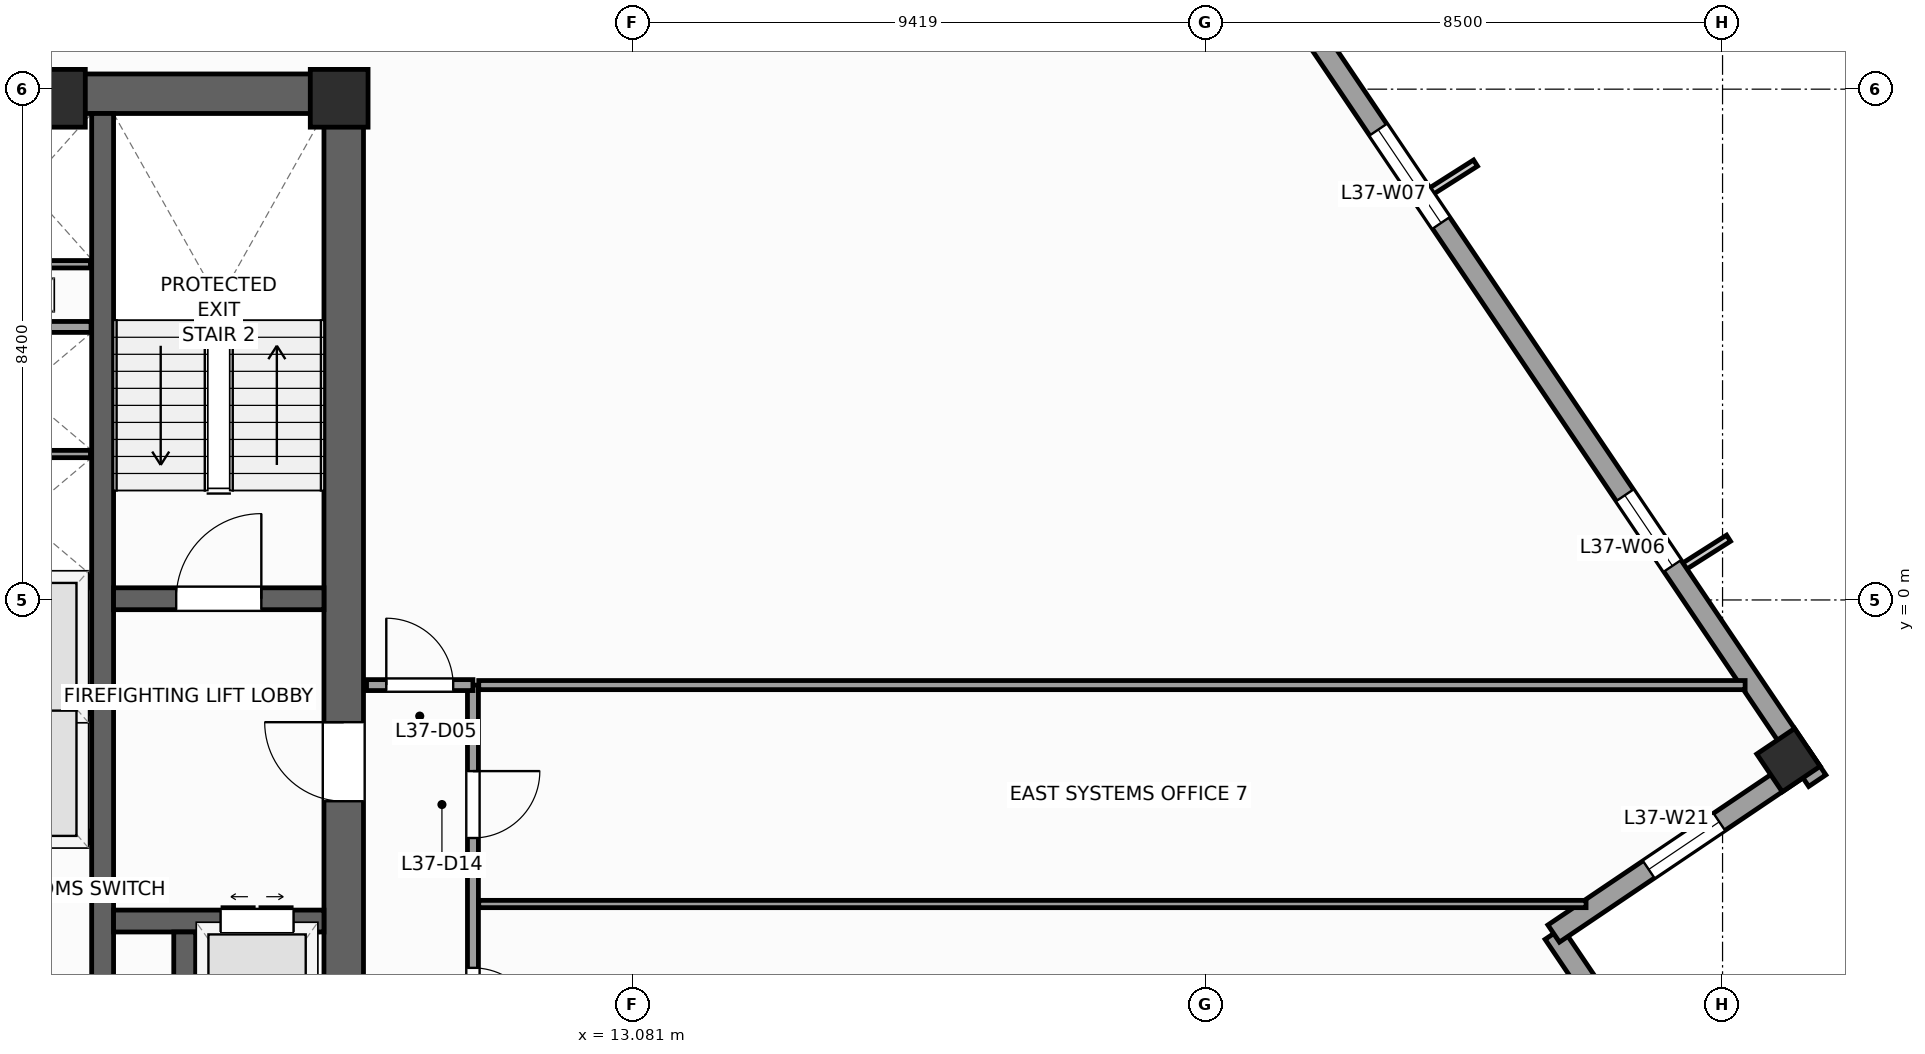
"""IFC4 building model, lengths in metres.
Left out: names, types, materials, properties, quantities, classifications, styles, units other than length and angle.
Written with IfcOpenShell. Run it as: python <this file> out.ifc"""

import sys

from ifc_helpers import new_model, si_unit, direction, frame, frame_2d, origin, origin_2d, place, context, subcontext, project, spatial, rectangle, extrude, source, transform, mapped, element, fill, save


model = new_model("IFC4")
c1 = context("Model", 3, precision=1e-05, world=origin(), true_north=direction((0.0, 1.0)))
c2 = subcontext(c1, "Body", "Model", "MODEL_VIEW")
j1 = project(units=[si_unit("LENGTHUNIT", "METRE"), si_unit("PLANEANGLEUNIT", "RADIAN")], contexts=[c1])
p1 = place(None, origin())
s1 = spatial("IfcSite", under=j1, at=p1, CompositionType="ELEMENT")
p2 = place(p1, origin())
s2 = spatial("IfcBuilding", under=s1, at=p2, CompositionType="ELEMENT")
p3 = place(p2, frame((0.0, 0.0, 156.4)))
s3 = spatial("IfcBuildingStorey", under=s2, at=p3, CompositionType="ELEMENT", Elevation=156.4)
p4 = place(p3, frame((-8.65, 8.325, 0.0), z_axis=(0.0, 0.0, 1.0), x_axis=(1.0, 0.0, 0.0)))
e1 = element("IfcWall", 1, at=p4, inside=s3, PredefinedType="SHEAR", context=c2, shape_type="SweptSolid", body=[
    extrude(rectangle(XDim=17.3, YDim=0.65, at=frame_2d((8.65, 0.0))), origin(), (0.0, 0.0, 1.0), 4.0),
])
p5 = place(p3, frame((8.325, -8.0, 0.0), z_axis=(0.0, 0.0, 1.0), x_axis=(0.0, 1.0, 0.0)))
e2 = element("IfcWall", 2, at=p5, inside=s3, PredefinedType="SHEAR", context=c2, shape_type="SweptSolid", body=[
    extrude(rectangle(XDim=16.0, YDim=0.65, at=frame_2d((8.0, 0.0))), origin(), (0.0, 0.0, 1.0), 4.0),
])
p6 = place(p5, frame((4.69, 0.0, 0.0)))
e3 = element("IfcOpeningElement", 3, at=p6, cuts=e2, PredefinedType="OPENING", context=c2, shape_type="SweptSolid", body=[
    extrude(rectangle(XDim=1.3, YDim=2.2, at=frame_2d((0.65, 1.1))), frame((0.0, 0.335, 0.0), z_axis=(0.0, -1.0, 0.0), x_axis=(1.0, 0.0, 0.0)), (0.0, 0.0, 1.0), 0.67),
])
p7 = place(p3, frame((4.36, -8.0, 0.0), z_axis=(0.0, 0.0, 1.0), x_axis=(0.0, 1.0, 0.0)))
e4 = element("IfcWall", 4, at=p7, inside=s3, PredefinedType="SHEAR", context=c2, shape_type="SweptSolid", body=[
    extrude(rectangle(XDim=16.0, YDim=0.36, at=frame_2d((8.0, 0.0))), origin(), (0.0, 0.0, 1.0), 4.0),
])
p8 = place(p3, frame((4.54, 0.02, 0.0), z_axis=(0.0, 0.0, 1.0), x_axis=(1.0, 0.0, 0.0)))
e5 = element("IfcWall", 5, at=p8, inside=s3, PredefinedType="SHEAR", context=c2, shape_type="SweptSolid", body=[
    extrude(rectangle(XDim=3.46, YDim=0.36, at=frame_2d((1.73, 0.0))), origin(), (0.0, 0.0, 1.0), 4.0),
])
p9 = place(p8, frame((1.03, 0.0, 0.0)))
e6 = element("IfcOpeningElement", 6, at=p9, cuts=e5, PredefinedType="OPENING", context=c2, shape_type="SweptSolid", body=[
    extrude(rectangle(XDim=1.4, YDim=2.2, at=frame_2d((0.7, 1.1))), frame((0.0, 0.19, 0.0), z_axis=(0.0, -1.0, 0.0), x_axis=(1.0, 0.0, 0.0)), (0.0, 0.0, 1.0), 0.38),
])
p10 = place(p3, frame((4.54, -5.28, 0.0), z_axis=(0.0, 0.0, 1.0), x_axis=(1.0, 0.0, 0.0)))
e7 = element("IfcWall", 7, at=p10, inside=s3, PredefinedType="SHEAR", context=c2, shape_type="SweptSolid", body=[
    extrude(rectangle(XDim=3.46, YDim=0.36, at=frame_2d((1.73, 0.0))), origin(), (0.0, 0.0, 1.0), 4.0),
])
p11 = place(p10, frame((1.76, 0.0, 0.0)))
e8 = element("IfcOpeningElement", 8, at=p11, cuts=e7, PredefinedType="OPENING", context=c2, shape_type="SweptSolid", body=[
    extrude(rectangle(XDim=1.2, YDim=2.25, at=frame_2d((0.6, 1.125))), frame((0.0, 0.19, 0.0), z_axis=(0.0, -1.0, 0.0), x_axis=(1.0, 0.0, 0.0)), (0.0, 0.0, 1.0), 0.38),
])
p12 = place(p3, frame((5.71, -8.0, 0.0), z_axis=(0.0, 0.0, 1.0), x_axis=(0.0, 1.0, 0.0)))
e9 = element("IfcWall", 9, at=p12, inside=s3, PredefinedType="SHEAR", context=c2, shape_type="SweptSolid", body=[
    extrude(rectangle(XDim=2.54, YDim=0.36, at=frame_2d((1.27, 0.0))), origin(), (0.0, 0.0, 1.0), 4.0),
])
m1 = source(origin(), c2, "Body", "SweptSolid", [
    extrude(rectangle(XDim=0.95, YDim=0.95, at=origin_2d()), origin(), (0.0, 0.0, 1.0), 4.0),
])
for number, where, z_axis, x_axis in (
    (10, (8.25, 8.25, 0.0), (0.0, 0.0, 1.0), (1.0, 0.0, 0.0)),
    (11, (3.6, 8.25, 0.0), (0.0, 0.0, 1.0), (1.0, 0.0, 0.0)),
):
    element("IfcColumn", number, at=place(p3, frame(where, z_axis=z_axis, x_axis=x_axis)), inside=s3, PredefinedType="PILASTER", context=c2, shape_type="MappedRepresentation", body=[
        mapped(m1, transform((0.0, 0.0, 0.0), scale=1.0)),
    ])
m2 = source(origin(), c2, "Body", "SweptSolid", [
    extrude(rectangle(XDim=0.75, YDim=0.75, at=origin_2d()), origin(), (0.0, 0.0, 1.0), 4.0),
])
p13 = place(p3, frame((32.083, -2.635, 0.0), z_axis=(0.0, 0.0, 1.0), x_axis=(0.829037572555, 0.559192903471, 0.0)))
e12 = element("IfcColumn", 12, at=p13, inside=s3, PredefinedType="COLUMN", context=c2, shape_type="MappedRepresentation", body=[
    mapped(m2, transform((0.0, 0.0, 0.0), scale=1.0)),
])
p14 = place(p3, frame((31.019, -9.631, 0.0), z_axis=(0.0, 0.0, 1.0), x_axis=(-0.559210350234, 0.829025804298, 0.0)))
e13 = element("IfcWall", 13, at=p14, inside=s3, PredefinedType="STANDARD", context=c2, shape_type="SweptSolid", body=[
    extrude(rectangle(XDim=5.0, YDim=0.34, at=frame_2d((2.5, 0.0))), origin(), (0.0, 0.0, 1.0), 3.74),
])
p15 = place(p3, frame((28.223, -5.486, 0.0), z_axis=(0.0, 0.0, 1.0), x_axis=(0.82905227345, 0.559171107879, 0.0)))
e14 = element("IfcWall", 14, at=p15, inside=s3, PredefinedType="STANDARD", context=c2, shape_type="SweptSolid", body=[
    extrude(rectangle(XDim=5.17, YDim=0.34, at=frame_2d((2.585, 0.0))), origin(), (0.0, 0.0, 1.0), 3.04),
])
p16 = place(p15, frame((1.885, 0.0, 0.56)))
e15 = element("IfcOpeningElement", 15, at=p16, cuts=e14, PredefinedType="OPENING", context=c2, shape_type="SweptSolid", body=[
    extrude(rectangle(XDim=1.4, YDim=2.4, at=frame_2d((0.7, 1.2))), frame((0.0, 0.18, 0.0), z_axis=(0.0, -1.0, 0.0), x_axis=(1.0, 0.0, 0.0)), (0.0, 0.0, 1.0), 0.36),
])
p17 = place(p3, frame((32.558, -2.972, 0.0), z_axis=(0.0, 0.0, 1.0), x_axis=(-0.559194910251, 0.829036218961, 0.0)))
e16 = element("IfcWall", 16, at=p17, inside=s3, PredefinedType="STANDARD", context=c2, shape_type="SweptSolid", body=[
    extrude(rectangle(XDim=41.34, YDim=0.34, at=frame_2d((20.67, 0.0))), origin(), (0.0, 0.0, 1.0), 3.04),
])
p18 = place(p17, frame((25.745, 0.0, 0.0)))
e17 = element("IfcOpeningElement", 17, at=p18, cuts=e16, PredefinedType="OPENING", context=c2, shape_type="SweptSolid", body=[
    extrude(rectangle(XDim=1.05, YDim=2.25, at=frame_2d((0.525, 1.125))), frame((0.0, 0.18, 0.0), z_axis=(0.0, -1.0, 0.0), x_axis=(1.0, 0.0, 0.0)), (0.0, 0.0, 1.0), 0.36),
])
p19 = place(p17, frame((4.261, 0.0, 0.56)))
e18 = element("IfcOpeningElement", 18, at=p19, cuts=e16, PredefinedType="OPENING", context=c2, shape_type="SweptSolid", body=[
    extrude(rectangle(XDim=1.4, YDim=2.4, at=frame_2d((0.7, 1.2))), frame((0.0, 0.18, 0.0), z_axis=(0.0, -1.0, 0.0), x_axis=(1.0, 0.0, 0.0)), (0.0, 0.0, 1.0), 0.36),
])
p20 = place(p17, frame((11.064, 0.0, 0.61)))
e19 = element("IfcOpeningElement", 19, at=p20, cuts=e16, PredefinedType="OPENING", context=c2, shape_type="SweptSolid", body=[
    extrude(rectangle(XDim=1.85, YDim=2.35, at=frame_2d((0.925, 1.175))), frame((0.0, 0.18, 0.0), z_axis=(0.0, -1.0, 0.0), x_axis=(1.0, 0.0, 0.0)), (0.0, 0.0, 1.0), 0.36),
])
p21 = place(p17, frame((18.168, 0.0, 0.61)))
e20 = element("IfcOpeningElement", 20, at=p21, cuts=e16, PredefinedType="OPENING", context=c2, shape_type="SweptSolid", body=[
    extrude(rectangle(XDim=1.85, YDim=2.35, at=frame_2d((0.925, 1.175))), frame((0.0, 0.18, 0.0), z_axis=(0.0, -1.0, 0.0), x_axis=(1.0, 0.0, 0.0)), (0.0, 0.0, 1.0), 0.36),
])
p22 = place(p17, frame((27.936, 0.0, 0.61)))
e21 = element("IfcOpeningElement", 21, at=p22, cuts=e16, PredefinedType="OPENING", context=c2, shape_type="SweptSolid", body=[
    extrude(rectangle(XDim=1.85, YDim=2.35, at=frame_2d((0.925, 1.175))), frame((0.0, 0.18, 0.0), z_axis=(0.0, -1.0, 0.0), x_axis=(1.0, 0.0, 0.0)), (0.0, 0.0, 1.0), 0.36),
])
p23 = place(p17, frame((34.852, 0.0, 0.56)))
e22 = element("IfcOpeningElement", 22, at=p23, cuts=e16, PredefinedType="OPENING", context=c2, shape_type="SweptSolid", body=[
    extrude(rectangle(XDim=1.4, YDim=2.4, at=frame_2d((0.7, 1.2))), frame((0.0, 0.18, 0.0), z_axis=(0.0, -1.0, 0.0), x_axis=(1.0, 0.0, 0.0)), (0.0, 0.0, 1.0), 0.36),
])
for number, where, z_axis, x_axis in (
    (23, (1.89, -3.9, 0.0), (0.0, 0.0, 1.0), (1.0, 0.0, 0.0)),
    (24, (1.89, 0.3, 0.0), (0.0, 0.0, 1.0), (1.0, 0.0, 0.0)),
    (25, (1.89, 4.49, 0.0), (0.0, 0.0, 1.0), (1.0, 0.0, 0.0)),
):
    element("IfcWall", number, at=place(p3, frame(where, z_axis=z_axis, x_axis=x_axis)), inside=s3, PredefinedType="PARTITIONING", context=c2, shape_type="SweptSolid", body=[
        extrude(rectangle(XDim=2.28, YDim=0.18, at=frame_2d((1.14, 0.0))), origin(), (0.0, 0.0, 1.0), 3.74),
    ])
for number, where, z_axis, x_axis in (
    (26, (1.9, -1.8, 0.0), (0.0, 0.0, 1.0), (1.0, 0.0, 0.0)),
    (27, (1.9, 2.4, 0.0), (0.0, 0.0, 1.0), (1.0, 0.0, 0.0)),
):
    element("IfcWall", number, at=place(p3, frame(where, z_axis=z_axis, x_axis=x_axis)), inside=s3, PredefinedType="PARTITIONING", context=c2, shape_type="SweptSolid", body=[
        extrude(rectangle(XDim=2.26, YDim=0.12, at=frame_2d((1.13, 0.0))), origin(), (0.0, 0.0, 1.0), 3.74),
    ])
p24 = place(p3, frame((2.06, 5.52, 0.0), z_axis=(0.0, 0.0, 1.0), x_axis=(1.0, 0.0, 0.0)))
e28 = element("IfcWall", 28, at=p24, inside=s3, PredefinedType="PARTITIONING", context=c2, shape_type="SweptSolid", body=[
    extrude(rectangle(XDim=2.1, YDim=0.12, at=frame_2d((1.05, 0.0))), origin(), (0.0, 0.0, 1.0), 3.74),
])
p25 = place(p3, frame((10.45, -11.45, 0.0), z_axis=(0.0, 0.0, 1.0), x_axis=(0.0, 1.0, 0.0)))
e29 = element("IfcWall", 29, at=p25, inside=s3, PredefinedType="PARTITIONING", context=c2, shape_type="SweptSolid", body=[
    extrude(rectangle(XDim=10.05, YDim=0.18, at=frame_2d((5.025, 0.0))), origin(), (0.0, 0.0, 1.0), 3.74),
])
p26 = place(p25, frame((4.3, 0.0, 0.0)))
e30 = element("IfcOpeningElement", 30, at=p26, cuts=e29, PredefinedType="OPENING", context=c2, shape_type="SweptSolid", body=[
    extrude(rectangle(XDim=1.1, YDim=2.2, at=frame_2d((0.55, 1.1))), frame((0.0, 0.1, 0.0), z_axis=(0.0, -1.0, 0.0), x_axis=(1.0, 0.0, 0.0)), (0.0, 0.0, 1.0), 0.2),
])
p27 = place(p25, frame((7.536, 0.0, 0.0)))
e31 = element("IfcOpeningElement", 31, at=p27, cuts=e29, PredefinedType="OPENING", context=c2, shape_type="SweptSolid", body=[
    extrude(rectangle(XDim=1.1, YDim=2.2, at=frame_2d((0.55, 1.1))), frame((0.0, 0.1, 0.0), z_axis=(0.0, -1.0, 0.0), x_axis=(1.0, 0.0, 0.0)), (0.0, 0.0, 1.0), 0.2),
])
p28 = place(p3, frame((8.7, -1.4, 0.0), z_axis=(0.0, 0.0, 1.0), x_axis=(1.0, 0.0, 0.0)))
e32 = element("IfcWall", 32, at=p28, inside=s3, PredefinedType="PARTITIONING", context=c2, shape_type="SweptSolid", body=[
    extrude(rectangle(XDim=1.75, YDim=0.18, at=frame_2d((0.875, 0.0))), origin(), (0.0, 0.0, 1.0), 3.74),
])
p29 = place(p28, frame((0.325, 0.0, 0.0)))
e33 = element("IfcOpeningElement", 33, at=p29, cuts=e32, PredefinedType="OPENING", context=c2, shape_type="SweptSolid", body=[
    extrude(rectangle(XDim=1.1, YDim=2.2, at=frame_2d((0.55, 1.1))), frame((0.0, 0.1, 0.0), z_axis=(0.0, -1.0, 0.0), x_axis=(1.0, 0.0, 0.0)), (0.0, 0.0, 1.0), 0.2),
])
p30 = place(p3, frame((10.545, -1.4, 0.0), z_axis=(0.0, 0.0, 1.0), x_axis=(1.0, 0.0, 0.0)))
e34 = element("IfcWall", 34, at=p30, inside=s3, PredefinedType="PARTITIONING", context=c2, shape_type="SweptSolid", body=[
    extrude(rectangle(XDim=20.826, YDim=0.15, at=frame_2d((10.413, 0.0))), origin(), (0.0, 0.0, 1.0), 3.74),
])
p31 = place(p3, frame((10.545, -5.0, 0.0), z_axis=(0.0, 0.0, 1.0), x_axis=(1.0, 0.0, 0.0)))
e35 = element("IfcWall", 35, at=p31, inside=s3, PredefinedType="PARTITIONING", context=c2, shape_type="SweptSolid", body=[
    extrude(rectangle(XDim=18.21, YDim=0.12, at=frame_2d((9.105, 0.0))), origin(), (0.0, 0.0, 1.0), 3.74),
])
m3 = source(origin(), c2, "Body", "SweptSolid", [
    extrude(rectangle(XDim=1.4, YDim=2.4, at=frame_2d((0.7, 1.2))), frame((0.0, 0.03, 0.0), z_axis=(0.0, -1.0, 0.0), x_axis=(1.0, 0.0, 0.0)), (0.0, 0.0, 1.0), 0.06),
])
p32 = place(p19, origin())
e36 = element("IfcWindow", 36, at=p32, inside=s3, PartitioningType="SINGLE_PANEL", PredefinedType="WINDOW", context=c2, shape_type="MappedRepresentation", body=[
    mapped(m3, transform((0.0, 0.0, 0.0), scale=1.0)),
])
fill(e18, e36)
m4 = source(origin(), c2, "Body", "SweptSolid", [
    extrude(rectangle(XDim=1.85, YDim=2.35, at=frame_2d((0.925, 1.175))), frame((0.0, 0.03, 0.0), z_axis=(0.0, -1.0, 0.0), x_axis=(1.0, 0.0, 0.0)), (0.0, 0.0, 1.0), 0.06),
])
p33 = place(p20, origin())
e37 = element("IfcWindow", 37, at=p33, inside=s3, PartitioningType="SINGLE_PANEL", PredefinedType="WINDOW", context=c2, shape_type="MappedRepresentation", body=[
    mapped(m4, transform((0.0, 0.0, 0.0), scale=1.0)),
])
fill(e19, e37)
p34 = place(p16, origin())
e38 = element("IfcWindow", 38, at=p34, inside=s3, PartitioningType="SINGLE_PANEL", PredefinedType="WINDOW", context=c2, shape_type="MappedRepresentation", body=[
    mapped(m3, transform((0.0, 0.0, 0.0), scale=1.0)),
])
fill(e15, e38)
m5 = source(origin(), c2, "Body", "SweptSolid", [
    extrude(rectangle(XDim=1.4, YDim=2.2, at=frame_2d((0.7, 1.1))), frame((0.0, 0.025, 0.0), z_axis=(0.0, -1.0, 0.0), x_axis=(1.0, 0.0, 0.0)), (0.0, 0.0, 1.0), 0.05),
])
p35 = place(p9, origin())
e39 = element("IfcDoor", 39, at=p35, inside=s3, OperationType="SINGLE_SWING_RIGHT", PredefinedType="DOOR", context=c2, shape_type="MappedRepresentation", body=[
    mapped(m5, transform((0.0, 0.0, 0.0), scale=1.0)),
])
fill(e6, e39)
m6 = source(origin(), c2, "Body", "SweptSolid", [
    extrude(rectangle(XDim=1.3, YDim=2.2, at=frame_2d((0.65, 1.1))), frame((0.0, 0.025, 0.0), z_axis=(0.0, -1.0, 0.0), x_axis=(1.0, 0.0, 0.0)), (0.0, 0.0, 1.0), 0.05),
])
p36 = place(p6, origin())
e40 = element("IfcDoor", 40, at=p36, inside=s3, OperationType="SINGLE_SWING_RIGHT", PredefinedType="DOOR", context=c2, shape_type="MappedRepresentation", body=[
    mapped(m6, transform((0.0, 0.0, 0.0), scale=1.0)),
])
fill(e3, e40)
m7 = source(origin(), c2, "Body", "SweptSolid", [
    extrude(rectangle(XDim=1.2, YDim=2.25, at=frame_2d((0.6, 1.125))), frame((0.0, 0.025, 0.0), z_axis=(0.0, -1.0, 0.0), x_axis=(1.0, 0.0, 0.0)), (0.0, 0.0, 1.0), 0.05),
])
p37 = place(p11, origin())
e41 = element("IfcDoor", 41, at=p37, inside=s3, OperationType="DOUBLE_DOOR_SLIDING", PredefinedType="DOOR", context=c2, shape_type="MappedRepresentation", body=[
    mapped(m7, transform((0.0, 0.0, 0.0), scale=1.0)),
])
fill(e8, e41)
m8 = source(origin(), c2, "Body", "SweptSolid", [
    extrude(rectangle(XDim=1.1, YDim=2.2, at=frame_2d((0.55, 1.1))), frame((0.0, 0.025, 0.0), z_axis=(0.0, -1.0, 0.0), x_axis=(1.0, 0.0, 0.0)), (0.0, 0.0, 1.0), 0.05),
])
p38 = place(p29, origin())
e42 = element("IfcDoor", 42, at=p38, inside=s3, OperationType="SINGLE_SWING_LEFT", PredefinedType="DOOR", context=c2, shape_type="MappedRepresentation", body=[
    mapped(m8, transform((0.0, 0.0, 0.0), scale=1.0)),
])
fill(e33, e42)
p39 = place(p26, frame((1.1, 0.0, 0.0), z_axis=(0.0, 0.0, 1.0), x_axis=(-1.0, 0.0, 0.0)))
e43 = element("IfcDoor", 43, at=p39, inside=s3, OperationType="SINGLE_SWING_LEFT", PredefinedType="DOOR", context=c2, shape_type="MappedRepresentation", body=[
    mapped(m8, transform((0.0, 0.0, 0.0), scale=1.0)),
])
fill(e30, e43)
p40 = place(p27, frame((1.1, 0.0, 0.0), z_axis=(0.0, 0.0, 1.0), x_axis=(-1.0, 0.0, 0.0)))
e44 = element("IfcDoor", 44, at=p40, inside=s3, OperationType="SINGLE_SWING_RIGHT", PredefinedType="DOOR", context=c2, shape_type="MappedRepresentation", body=[
    mapped(m8, transform((0.0, 0.0, 0.0), scale=1.0)),
])
fill(e31, e44)
save(model, sys.argv[1])
